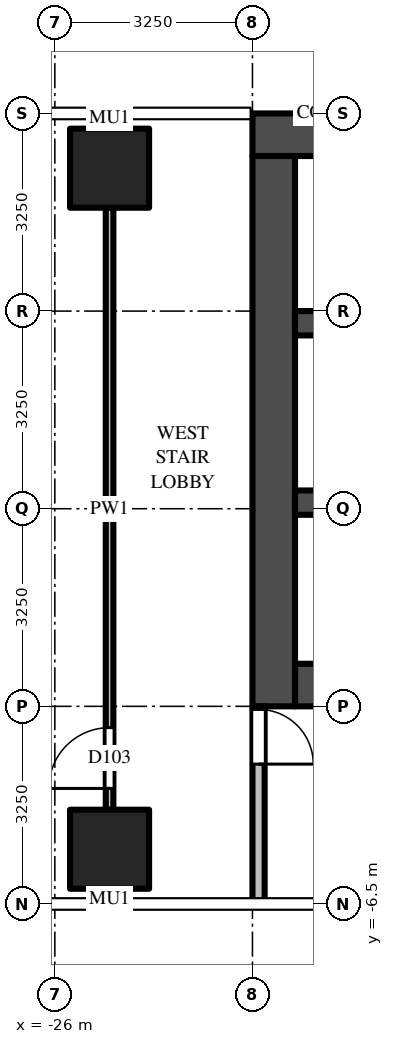
"""IFC4 building model, lengths in metres.
Left out: names, types, materials, properties, quantities, classifications, styles, units other than length and angle.
Written with IfcOpenShell. Run it as: python <this file> out.ifc"""

import sys

from ifc_helpers import new_model, si_unit, direction, frame, frame_2d, origin, origin_2d, place, context, subcontext, project, spatial, rectangle, extrude, source, transform, mapped, element, fill, save


model = new_model("IFC4")
c1 = context("Model", 3, precision=1e-05, world=origin(), true_north=direction((0.0, 1.0)))
c2 = subcontext(c1, "Body", "Model", "MODEL_VIEW")
j1 = project(units=[si_unit("LENGTHUNIT", "METRE"), si_unit("PLANEANGLEUNIT", "RADIAN")], contexts=[c1])
p1 = place(None, origin())
s1 = spatial("IfcSite", under=j1, at=p1, CompositionType="ELEMENT")
p2 = place(p1, origin())
s2 = spatial("IfcBuilding", under=s1, at=p2, CompositionType="ELEMENT")
p3 = place(p2, frame((0.0, 0.0, 97.5)))
s3 = spatial("IfcBuildingStorey", under=s2, at=p3, CompositionType="ELEMENT", Elevation=97.5)
m1 = source(origin(), c2, "Body", "SweptSolid", [
    extrude(rectangle(XDim=1.3, YDim=1.3, at=origin_2d()), origin(), (0.0, 0.0, 1.0), 4.5),
])
for number, where, z_axis, x_axis in (
    (1, (-25.1, -5.6, 0.0), (0.0, 0.0, 1.0), (1.0, 0.0, 0.0)),
    (2, (-25.1, 5.6, 0.0), (0.0, 0.0, 1.0), (1.0, 0.0, 0.0)),
):
    element("IfcColumn", number, at=place(p3, frame(where, z_axis=z_axis, x_axis=x_axis)), inside=s3, PredefinedType="COLUMN", context=c2, shape_type="MappedRepresentation", body=[
        mapped(m1, transform((0.0, 0.0, 0.0))),
    ])
m2 = source(origin(), c2, "Body", "SweptSolid", [
    extrude(rectangle(XDim=16.5, YDim=0.7, at=frame_2d((8.25, 0.0))), origin(), (0.0, 0.0, 1.0), 4.25),
])
p4 = place(p3, frame((-6.25, 6.15, 0.0), z_axis=(0.0, 0.0, 1.0), x_axis=(-1.0, 0.0, 0.0)))
e3 = element("IfcWall", 3, at=p4, inside=s3, PredefinedType="SHEAR", context=c2, shape_type="MappedRepresentation", body=[
    mapped(m2, transform((0.0, 0.0, 0.0))),
])
m3 = source(origin(), c2, "Body", "SweptSolid", [
    extrude(rectangle(XDim=14.85, YDim=0.7, at=frame_2d((7.425, 0.0))), origin(), (0.0, 0.0, 1.0), 4.25),
])
p5 = place(p3, frame((-7.2, -2.9, 0.0), z_axis=(0.0, 0.0, 1.0), x_axis=(-1.0, 0.0, 0.0)))
e4 = element("IfcWall", 4, at=p5, inside=s3, PredefinedType="SHEAR", context=c2, shape_type="MappedRepresentation", body=[
    mapped(m3, transform((0.0, 0.0, 0.0))),
])
m4 = source(origin(), c2, "Body", "SweptSolid", [
    extrude(rectangle(XDim=1.3, YDim=2.1, at=frame_2d((0.65, 1.05))), frame((0.0, 0.36, 0.0), z_axis=(0.0, -1.0, 0.0), x_axis=(1.0, 0.0, 0.0)), (0.0, 0.0, 1.0), 0.72),
])
p6 = place(p5, frame((12.2, 0.0, 0.0)))
e5 = element("IfcOpeningElement", 5, at=p6, cuts=e4, PredefinedType="OPENING", context=c2, shape_type="MappedRepresentation", body=[
    mapped(m4, transform((0.0, 0.0, 0.0))),
])
m5 = source(origin(), c2, "Body", "SweptSolid", [
    extrude(rectangle(XDim=1.2, YDim=2.1, at=frame_2d((0.6, 1.05))), frame((0.0, 0.36, 0.0), z_axis=(0.0, -1.0, 0.0), x_axis=(1.0, 0.0, 0.0)), (0.0, 0.0, 1.0), 0.72),
])
p7 = place(p5, frame((9.85, 0.0, 0.0)))
e6 = element("IfcOpeningElement", 6, at=p7, cuts=e4, PredefinedType="OPENING", context=c2, shape_type="MappedRepresentation", body=[
    mapped(m5, transform((0.0, 0.0, 0.0))),
])
m6 = source(origin(), c2, "Body", "SweptSolid", [
    extrude(rectangle(XDim=1.0, YDim=2.1, at=frame_2d((0.5, 1.05))), frame((0.0, 0.36, 0.0), z_axis=(0.0, -1.0, 0.0), x_axis=(1.0, 0.0, 0.0)), (0.0, 0.0, 1.0), 0.72),
])
p8 = place(p5, frame((7.9, 0.0, 0.0)))
e7 = element("IfcOpeningElement", 7, at=p8, cuts=e4, PredefinedType="OPENING", context=c2, shape_type="MappedRepresentation", body=[
    mapped(m6, transform((0.0, 0.0, 0.0))),
])
m7 = source(origin(), c2, "Body", "SweptSolid", [
    extrude(rectangle(XDim=0.9, YDim=2.1, at=frame_2d((0.45, 1.05))), frame((0.0, 0.36, 0.0), z_axis=(0.0, -1.0, 0.0), x_axis=(1.0, 0.0, 0.0)), (0.0, 0.0, 1.0), 0.72),
])
p9 = place(p5, frame((0.65, 0.0, 0.0)))
e8 = element("IfcOpeningElement", 8, at=p9, cuts=e4, PredefinedType="OPENING", context=c2, shape_type="MappedRepresentation", body=[
    mapped(m7, transform((0.0, 0.0, 0.0))),
])
p10 = place(p5, frame((3.25, 0.0, 0.0)))
e9 = element("IfcOpeningElement", 9, at=p10, cuts=e4, PredefinedType="OPENING", context=c2, shape_type="MappedRepresentation", body=[
    mapped(m7, transform((0.0, 0.0, 0.0))),
])
p11 = place(p5, frame((5.8, 0.0, 0.0)))
e10 = element("IfcOpeningElement", 10, at=p11, cuts=e4, PredefinedType="OPENING", context=c2, shape_type="MappedRepresentation", body=[
    mapped(m6, transform((0.0, 0.0, 0.0))),
])
m8 = source(origin(), c2, "Body", "SweptSolid", [
    extrude(rectangle(XDim=9.05, YDim=0.7, at=frame_2d((4.525, 0.0))), origin(), (0.0, 0.0, 1.0), 4.25),
])
p12 = place(p3, frame((-22.4, 5.8, 0.0), z_axis=(0.0, 0.0, 1.0), x_axis=(0.0, -1.0, 0.0)))
e11 = element("IfcWall", 11, at=p12, inside=s3, PredefinedType="SHEAR", context=c2, shape_type="MappedRepresentation", body=[
    mapped(m8, transform((0.0, 0.0, 0.0))),
])
m9 = source(origin(), c2, "Body", "SweptSolid", [
    extrude(rectangle(XDim=14.85, YDim=0.4, at=frame_2d((7.425, 0.0))), origin(), (0.0, 0.0, 1.0), 4.25),
])
p13 = place(p3, frame((-7.2, 0.1, 0.0), z_axis=(0.0, 0.0, 1.0), x_axis=(-1.0, 0.0, 0.0)))
e12 = element("IfcWall", 12, at=p13, inside=s3, PredefinedType="SHEAR", context=c2, shape_type="MappedRepresentation", body=[
    mapped(m9, transform((0.0, 0.0, 0.0))),
])
m10 = source(origin(), c2, "Body", "SweptSolid", [
    extrude(rectangle(XDim=1.0, YDim=2.1, at=frame_2d((0.5, 1.05))), frame((0.0, 0.21, 0.0), z_axis=(0.0, -1.0, 0.0), x_axis=(1.0, 0.0, 0.0)), (0.0, 0.0, 1.0), 0.42),
])
p14 = place(p13, frame((7.9, 0.0, 0.0)))
e13 = element("IfcOpeningElement", 13, at=p14, cuts=e12, PredefinedType="OPENING", context=c2, shape_type="MappedRepresentation", body=[
    mapped(m10, transform((0.0, 0.0, 0.0))),
])
m11 = source(origin(), c2, "Body", "SweptSolid", [
    extrude(rectangle(XDim=5.7, YDim=0.4, at=frame_2d((2.85, 0.0))), origin(), (0.0, 0.0, 1.0), 4.25),
])
p15 = place(p3, frame((-16.35, 3.05, 0.0), z_axis=(0.0, 0.0, 1.0), x_axis=(-1.0, 0.0, 0.0)))
e14 = element("IfcWall", 14, at=p15, inside=s3, PredefinedType="SHEAR", context=c2, shape_type="MappedRepresentation", body=[
    mapped(m11, transform((0.0, 0.0, 0.0))),
])
m12 = source(origin(), c2, "Body", "SweptSolid", [
    extrude(rectangle(XDim=3.25, YDim=0.2, at=frame_2d((1.625, 0.0))), origin(), (0.0, 0.0, 1.0), 4.25),
])
p16 = place(p3, frame((-22.65, -3.25, 0.0), z_axis=(0.0, 0.0, 1.0), x_axis=(0.0, -1.0, 0.0)))
e15 = element("IfcWall", 15, at=p16, inside=s3, PredefinedType="PARTITIONING", context=c2, shape_type="MappedRepresentation", body=[
    mapped(m12, transform((0.0, 0.0, 0.0))),
])
m13 = source(origin(), c2, "Body", "SweptSolid", [
    extrude(rectangle(XDim=0.9, YDim=2.1, at=frame_2d((0.45, 1.05))), frame((0.0, 0.11, 0.0), z_axis=(0.0, -1.0, 0.0), x_axis=(1.0, 0.0, 0.0)), (0.0, 0.0, 1.0), 0.22),
])
p17 = place(p16, frame((0.05, 0.0, 0.0)))
e16 = element("IfcOpeningElement", 16, at=p17, cuts=e15, PredefinedType="OPENING", context=c2, shape_type="MappedRepresentation", body=[
    mapped(m13, transform((0.0, 0.0, 0.0))),
])
m14 = source(origin(), c2, "Body", "SweptSolid", [
    extrude(rectangle(XDim=9.9, YDim=0.125, at=frame_2d((4.95, 0.0))), origin(), (0.0, 0.0, 1.0), 3.468),
])
p18 = place(p3, frame((-25.1, -4.95, 0.0), z_axis=(0.0, 0.0, 1.0), x_axis=(0.0, 1.0, 0.0)))
e17 = element("IfcWall", 17, at=p18, inside=s3, PredefinedType="PARTITIONING", context=c2, shape_type="MappedRepresentation", body=[
    mapped(m14, transform((0.0, 0.0, 0.0))),
])
m15 = source(origin(), c2, "Body", "SweptSolid", [
    extrude(rectangle(XDim=1.0, YDim=2.1, at=frame_2d((0.5, 1.05))), frame((0.0, 0.073, 0.0), z_axis=(0.0, -1.0, 0.0), x_axis=(1.0, 0.0, 0.0)), (0.0, 0.0, 1.0), 0.145),
])
p19 = place(p18, frame((0.35, 0.0, 0.0)))
e18 = element("IfcOpeningElement", 18, at=p19, cuts=e17, PredefinedType="OPENING", context=c2, shape_type="MappedRepresentation", body=[
    mapped(m15, transform((0.0, 0.0, 0.0))),
])
m16 = source(origin(), c2, "Body", "SweptSolid", [
    extrude(rectangle(XDim=0.9, YDim=2.1, at=frame_2d((0.45, 1.05))), frame((0.0, 0.025, 0.0), z_axis=(0.0, -1.0, 0.0), x_axis=(1.0, 0.0, 0.0)), (0.0, 0.0, 1.0), 0.05),
])
p20 = place(p17, origin())
e19 = element("IfcDoor", 19, at=p20, inside=s3, OperationType="SINGLE_SWING_RIGHT", PredefinedType="DOOR", context=c2, shape_type="MappedRepresentation", body=[
    mapped(m16, transform((0.0, 0.0, 0.0))),
])
fill(e16, e19)
m17 = source(origin(), c2, "Body", "SweptSolid", [
    extrude(rectangle(XDim=1.0, YDim=2.1, at=frame_2d((0.5, 1.05))), frame((0.0, 0.025, 0.0), z_axis=(0.0, -1.0, 0.0), x_axis=(1.0, 0.0, 0.0)), (0.0, 0.0, 1.0), 0.05),
])
p21 = place(p19, origin())
e20 = element("IfcDoor", 20, at=p21, inside=s3, OperationType="SINGLE_SWING_LEFT", PredefinedType="DOOR", context=c2, shape_type="MappedRepresentation", body=[
    mapped(m17, transform((0.0, 0.0, 0.0))),
])
fill(e18, e20)
save(model, sys.argv[1])
